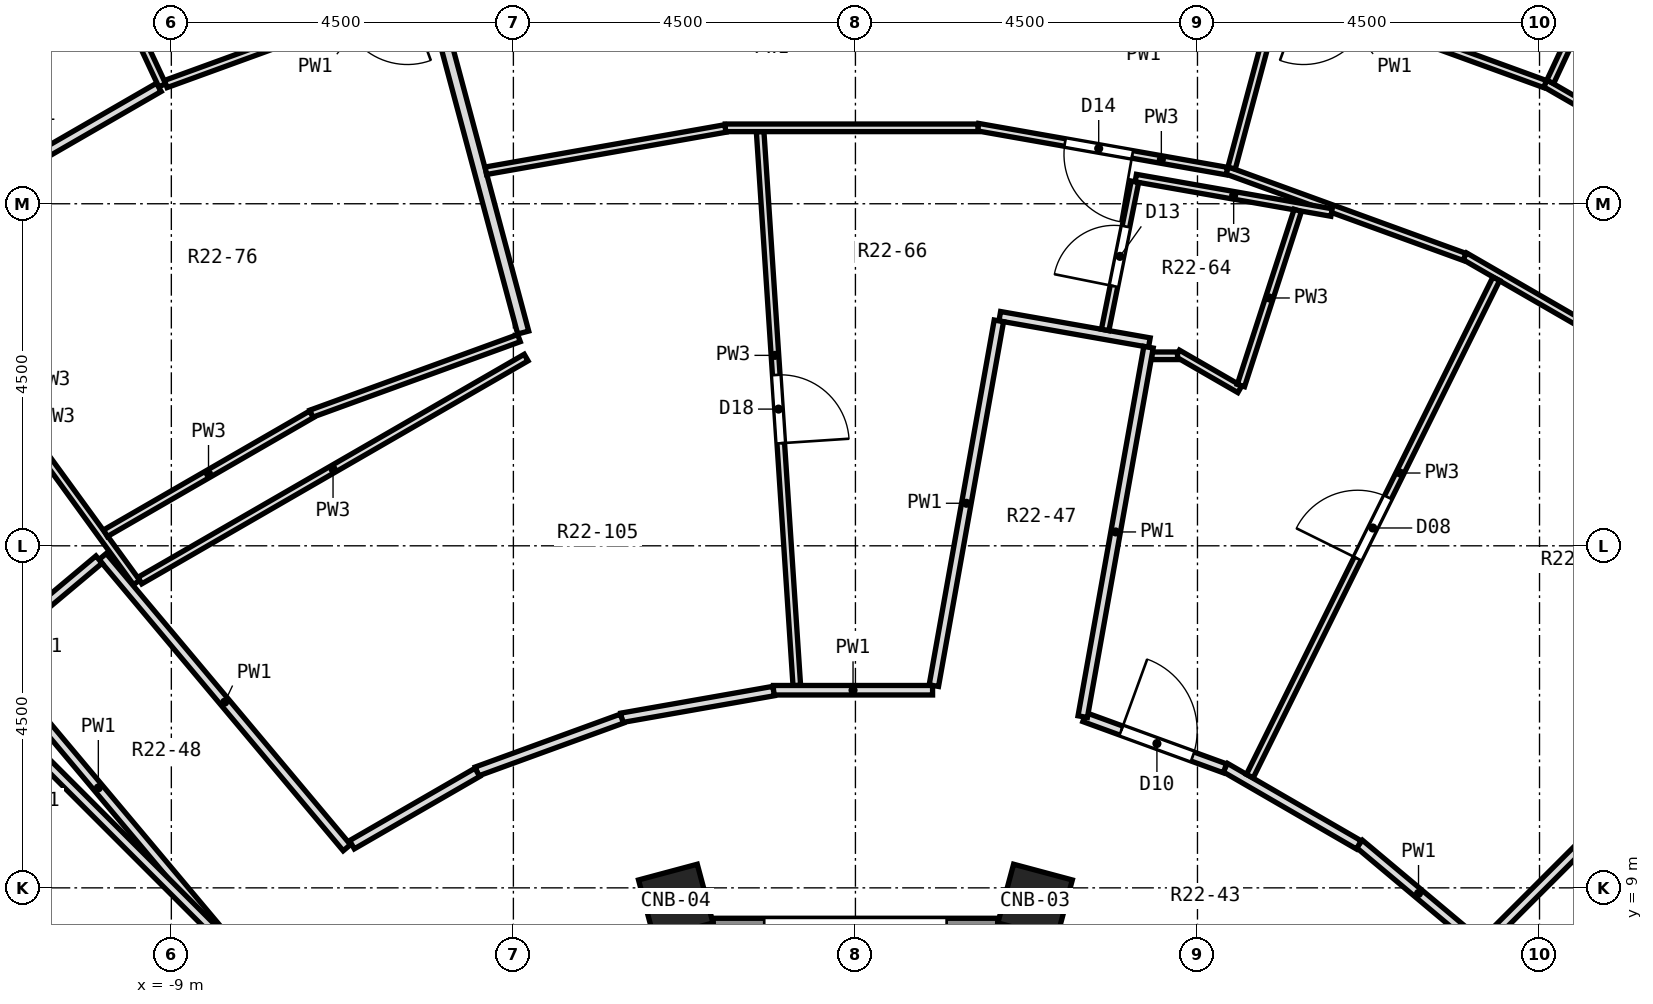
"""IFC4 building model, lengths in metres.
Left out: names, types, materials, properties, quantities, classifications, styles, units other than length and angle.
Written with IfcOpenShell. Run it as: python <this file> out.ifc"""

import sys

from ifc_helpers import new_model, si_unit, direction, frame, frame_2d, origin, origin_2d, place, context, subcontext, project, spatial, polyline, rectangle, outline, extrude, element, fill, save


model = new_model("IFC4")
c1 = context("Model", 3, precision=1e-05, world=origin(), true_north=direction((0.0, 1.0)))
c2 = subcontext(c1, "Body", "Model", "MODEL_VIEW")
j1 = project(units=[si_unit("LENGTHUNIT", "METRE"), si_unit("PLANEANGLEUNIT", "RADIAN")], contexts=[c1])
p1 = place(None, origin())
s1 = spatial("IfcSite", under=j1, at=p1, CompositionType="ELEMENT")
p2 = place(p1, origin())
s2 = spatial("IfcBuilding", under=s1, at=p2, CompositionType="ELEMENT")
p3 = place(p2, frame((0.0, 0.0, 141.4)))
s3 = spatial("IfcBuildingStorey", under=s2, at=p3, CompositionType="ELEMENT", Elevation=141.4)
for number, where, z_axis, x_axis in (
    (1, (2.364, 8.821, 0.0), (0.0, 0.0, 1.0), (0.259, 0.966, 0.0)),
    (2, (-2.364, 8.821, 0.0), (0.0, 0.0, 1.0), (-0.259, 0.966, 0.0)),
):
    element("IfcColumn", number, at=place(p3, frame(where, z_axis=z_axis, x_axis=x_axis)), inside=s3, PredefinedType="COLUMN", context=c2, shape_type="SweptSolid", body=[
        extrude(rectangle(XDim=0.8, YDim=0.8, at=origin_2d()), origin(), (0.0, 0.0, 1.0), 3.3),
    ])
p4 = place(p3, frame((1.874, 8.3, 0.0), z_axis=(0.0, 0.0, 1.0), x_axis=(-1.0, 0.0, 0.0)))
e3 = element("IfcWall", 3, at=p4, inside=s3, PredefinedType="SOLIDWALL", context=c2, shape_type="SweptSolid", body=[
    extrude(rectangle(XDim=3.748, YDim=0.6, at=frame_2d((1.874, 0.0))), origin(), (0.0, 0.0, 1.0), 2.8),
])
p5 = place(p4, frame((0.674, 0.0, 0.9)))
e4 = element("IfcOpeningElement", 4, at=p5, cuts=e3, PredefinedType="OPENING", context=c2, shape_type="SweptSolid", body=[
    extrude(rectangle(XDim=2.4, YDim=1.8, at=frame_2d((1.2, 0.9))), frame((0.0, 0.312, 0.0), z_axis=(0.0, -1.0, 0.0), x_axis=(1.0, 0.0, 0.0)), (0.0, 0.0, 1.0), 0.624),
])
p6 = place(p3, origin())
e5 = element("IfcWall", 5, at=p6, inside=s3, PredefinedType="SOLIDWALL", context=c2, shape_type="SweptSolid", body=[
    extrude(outline(polyline([(1.874, 8.538), (1.874, 8.0), (2.377, 7.865), (2.646, 8.331), (1.874, 8.538)])), origin(), (0.0, 0.0, 1.0), 2.8),
])
p7 = place(p3, origin())
e6 = element("IfcWall", 6, at=p7, inside=s3, PredefinedType="SOLIDWALL", context=c2, shape_type="SweptSolid", body=[
    extrude(outline(polyline([(-2.646, 8.331), (-2.377, 7.865), (-1.874, 8.0), (-1.874, 8.538), (-2.646, 8.331)])), origin(), (0.0, 0.0, 1.0), 2.8),
])
p8 = place(p3, frame((-1.254, 18.949, 0.0), z_axis=(0.0, 0.0, 1.0), x_axis=(0.066059696755, -0.997815672589, 0.0)))
e7 = element("IfcWall", 7, at=p8, inside=s3, PredefinedType="PARTITIONING", context=c2, shape_type="SweptSolid", body=[
    extrude(rectangle(XDim=7.303, YDim=0.1, at=frame_2d((3.651, 0.0))), origin(), (0.0, 0.0, 1.0), 2.8),
])
p9 = place(p8, frame((3.208, 0.0, 0.0)))
e8 = element("IfcOpeningElement", 8, at=p9, cuts=e7, PredefinedType="OPENING", context=c2, shape_type="SweptSolid", body=[
    extrude(rectangle(XDim=0.9, YDim=2.1, at=frame_2d((0.45, 1.05))), frame((0.0, 0.062, 0.0), z_axis=(0.0, -1.0, 0.0), x_axis=(1.0, 0.0, 0.0)), (0.0, 0.0, 1.0), 0.124),
])
p10 = place(p3, frame((-6.643, 24.791, 0.0), z_axis=(0.0, 0.0, 1.0), x_axis=(0.258629569049, -0.965976576328, 0.0)))
e9 = element("IfcWall", 9, at=p10, inside=s3, PredefinedType="PARTITIONING", context=c2, shape_type="SweptSolid", body=[
    extrude(rectangle(XDim=8.784, YDim=0.15, at=frame_2d((4.392, 0.0))), origin(), (0.0, 0.0, 1.0), 2.8),
])
p11 = place(p3, frame((-10.847, 23.26, 0.0), z_axis=(0.0, 0.0, 1.0), x_axis=(0.422784035137, -0.906230467173, 0.0)))
e10 = element("IfcWall", 10, at=p11, inside=s3, PredefinedType="PARTITIONING", context=c2, shape_type="SweptSolid", body=[
    extrude(rectangle(XDim=4.085, YDim=0.1, at=frame_2d((2.042, 0.0))), origin(), (0.0, 0.0, 1.0), 2.8),
])
p12 = place(p3, frame((-12.629, 17.382, 0.0), z_axis=(0.0, 0.0, 1.0), x_axis=(0.587934886014, -0.808908257967, 0.0)))
e11 = element("IfcWall", 11, at=p12, inside=s3, PredefinedType="PARTITIONING", context=c2, shape_type="SweptSolid", body=[
    extrude(rectangle(XDim=5.395, YDim=0.1, at=frame_2d((2.698, 0.0))), origin(), (0.0, 0.0, 1.0), 2.8),
])
p13 = place(p12, frame((0.84, 0.0, 0.0)))
e12 = element("IfcOpeningElement", 12, at=p13, cuts=e11, PredefinedType="OPENING", context=c2, shape_type="SweptSolid", body=[
    extrude(rectangle(XDim=1.0, YDim=2.1, at=frame_2d((0.5, 1.05))), frame((0.0, 0.062, 0.0), z_axis=(0.0, -1.0, 0.0), x_axis=(1.0, 0.0, 0.0)), (0.0, 0.0, 1.0), 0.124),
])
p14 = place(p3, frame((-11.511, 12.164, 0.0), z_axis=(0.0, 0.0, 1.0), x_axis=(0.64269368401, -0.766123246308, 0.0)))
e13 = element("IfcWall", 13, at=p14, inside=s3, PredefinedType="PARTITIONING", context=c2, shape_type="SweptSolid", body=[
    extrude(rectangle(XDim=4.826, YDim=0.125, at=frame_2d((2.413, 0.0))), origin(), (0.0, 0.0, 1.0), 2.8),
])
p15 = place(p3, frame((-9.904, 13.359, 0.0), z_axis=(0.0, 0.0, 1.0), x_axis=(0.64260671374, -0.766196196451, 0.0)))
e14 = element("IfcWall", 14, at=p15, inside=s3, PredefinedType="PARTITIONING", context=c2, shape_type="SweptSolid", body=[
    extrude(rectangle(XDim=5.0, YDim=0.125, at=frame_2d((2.5, 0.0))), origin(), (0.0, 0.0, 1.0), 2.8),
])
p16 = place(p3, frame((-13.097, 13.097, 0.0), z_axis=(0.0, 0.0, 1.0), x_axis=(0.707106781187, -0.707106781187, 0.0)))
e15 = element("IfcWall", 15, at=p16, inside=s3, PredefinedType="PARTITIONING", context=c2, shape_type="SweptSolid", body=[
    extrude(rectangle(XDim=6.815, YDim=0.125, at=frame_2d((3.407, 0.0))), origin(), (0.0, 0.0, 1.0), 2.8),
])
p17 = place(p3, frame((6.63, 9.579, 0.0), z_axis=(0.0, 0.0, 1.0), x_axis=(0.766246910896, -0.642546240781, 0.0)))
e16 = element("IfcWall", 16, at=p17, inside=s3, PredefinedType="PARTITIONING", context=c2, shape_type="SweptSolid", body=[
    extrude(rectangle(XDim=2.031, YDim=0.125, at=frame_2d((1.015, 0.0))), origin(), (0.0, 0.0, 1.0), 2.8),
])
p18 = place(p3, frame((4.865, 10.583, 0.0), z_axis=(0.0, 0.0, 1.0), x_axis=(0.865305530051, -0.50124479016, 0.0)))
e17 = element("IfcWall", 17, at=p18, inside=s3, PredefinedType="PARTITIONING", context=c2, shape_type="SweptSolid", body=[
    extrude(rectangle(XDim=2.031, YDim=0.125, at=frame_2d((1.015, 0.0))), origin(), (0.0, 0.0, 1.0), 2.8),
])
p19 = place(p3, frame((4.238, 16.031, 0.0), z_axis=(0.0, 0.0, 1.0), x_axis=(0.866215708717, -0.499670237228, 0.0)))
e18 = element("IfcWall", 18, at=p19, inside=s3, PredefinedType="PARTITIONING", context=c2, shape_type="SweptSolid", body=[
    extrude(rectangle(XDim=0.945, YDim=0.1, at=frame_2d((0.472, 0.0))), origin(), (0.0, 0.0, 1.0), 2.8),
])
p20 = place(p3, frame((8.016, 17.309, 0.0), z_axis=(0.0, 0.0, 1.0), x_axis=(0.865920199123, -0.500182175564, 0.0)))
e19 = element("IfcWall", 19, at=p20, inside=s3, PredefinedType="PARTITIONING", context=c2, shape_type="SweptSolid", body=[
    extrude(rectangle(XDim=3.325, YDim=0.1, at=frame_2d((1.663, 0.0))), origin(), (0.0, 0.0, 1.0), 2.8),
])
p21 = place(p3, frame((9.076, 19.583, 0.0), z_axis=(0.0, 0.0, 1.0), x_axis=(0.865841628869, -0.500318172484, 0.0)))
e20 = element("IfcWall", 20, at=p21, inside=s3, PredefinedType="PARTITIONING", context=c2, shape_type="SweptSolid", body=[
    extrude(rectangle(XDim=2.306, YDim=0.1, at=frame_2d((1.153, 0.0))), origin(), (0.0, 0.0, 1.0), 2.8),
])
p22 = place(p3, frame((3.013, 11.246, 0.0), z_axis=(0.0, 0.0, 1.0), x_axis=(0.939532310436, -0.342460271633, 0.0)))
e21 = element("IfcWall", 21, at=p22, inside=s3, PredefinedType="PARTITIONING", context=c2, shape_type="SweptSolid", body=[
    extrude(rectangle(XDim=1.968, YDim=0.125, at=frame_2d((0.984, 0.0))), origin(), (0.0, 0.0, 1.0), 2.8),
])
p23 = place(p22, frame((0.515, 0.0, 0.0)))
e22 = element("IfcOpeningElement", 22, at=p23, cuts=e21, PredefinedType="OPENING", context=c2, shape_type="SweptSolid", body=[
    extrude(rectangle(XDim=1.0, YDim=2.1, at=frame_2d((0.5, 1.05))), frame((0.0, 0.074, 0.0), z_axis=(0.0, -1.0, 0.0), x_axis=(1.0, 0.0, 0.0)), (0.0, 0.0, 1.0), 0.149),
])
p24 = place(p3, frame((4.888, 18.438, 0.0), z_axis=(0.0, 0.0, 1.0), x_axis=(0.939679760884, -0.342055473549, 0.0)))
e23 = element("IfcWall", 23, at=p24, inside=s3, PredefinedType="PARTITIONING", context=c2, shape_type="SweptSolid", body=[
    extrude(rectangle(XDim=3.325, YDim=0.1, at=frame_2d((1.663, 0.0))), origin(), (0.0, 0.0, 1.0), 2.8),
])
p25 = place(p3, frame((7.001, 20.329, 0.0), z_axis=(0.0, 0.0, 1.0), x_axis=(0.939728749343, -0.341920864613, 0.0)))
e24 = element("IfcWall", 24, at=p25, inside=s3, PredefinedType="PARTITIONING", context=c2, shape_type="SweptSolid", body=[
    extrude(rectangle(XDim=2.205, YDim=0.1, at=frame_2d((1.103, 0.0))), origin(), (0.0, 0.0, 1.0), 2.8),
])
p26 = place(p3, frame((1.899, 16.521, 0.0), z_axis=(0.0, 0.0, 1.0), x_axis=(0.984836400178, -0.173485633079, 0.0)))
e25 = element("IfcWall", 25, at=p26, inside=s3, PredefinedType="PARTITIONING", context=c2, shape_type="SweptSolid", body=[
    extrude(rectangle(XDim=1.998, YDim=0.125, at=frame_2d((0.999, 0.0))), origin(), (0.0, 0.0, 1.0), 2.8),
])
p27 = place(p3, frame((3.688, 18.338, 0.0), z_axis=(0.0, 0.0, 1.0), x_axis=(0.984859586639, -0.173353957572, 0.0)))
e26 = element("IfcWall", 26, at=p27, inside=s3, PredefinedType="PARTITIONING", context=c2, shape_type="SweptSolid", body=[
    extrude(rectangle(XDim=2.615, YDim=0.1, at=frame_2d((1.308, 0.0))), origin(), (0.0, 0.0, 1.0), 2.8),
])
p28 = place(p3, frame((1.612, 19.008, 0.0), z_axis=(0.0, 0.0, 1.0), x_axis=(0.984770991222, -0.173856535243, 0.0)))
e27 = element("IfcWall", 27, at=p28, inside=s3, PredefinedType="PARTITIONING", context=c2, shape_type="SweptSolid", body=[
    extrude(rectangle(XDim=3.325, YDim=0.1, at=frame_2d((1.663, 0.0))), origin(), (0.0, 0.0, 1.0), 2.8),
])
p29 = place(p28, frame((1.163, 0.0, 0.0)))
e28 = element("IfcOpeningElement", 28, at=p29, cuts=e27, PredefinedType="OPENING", context=c2, shape_type="SweptSolid", body=[
    extrude(rectangle(XDim=0.9, YDim=2.1, at=frame_2d((0.45, 1.05))), frame((0.0, 0.062, 0.0), z_axis=(0.0, -1.0, 0.0), x_axis=(1.0, 0.0, 0.0)), (0.0, 0.0, 1.0), 0.124),
])
p30 = place(p3, frame((-1.078, 11.6, 0.0), z_axis=(0.0, 0.0, 1.0), x_axis=(1.0, 0.0, 0.0)))
e29 = element("IfcWall", 29, at=p30, inside=s3, PredefinedType="PARTITIONING", context=c2, shape_type="SweptSolid", body=[
    extrude(rectangle(XDim=2.093, YDim=0.125, at=frame_2d((1.047, 0.0))), origin(), (0.0, 0.0, 1.0), 2.8),
])
p31 = place(p3, frame((3.899, 16.0, 0.0), z_axis=(0.0, 0.0, 1.0), x_axis=(1.0, 0.0, 0.0)))
e30 = element("IfcWall", 30, at=p31, inside=s3, PredefinedType="PARTITIONING", context=c2, shape_type="SweptSolid", body=[
    extrude(rectangle(XDim=0.339, YDim=0.1, at=frame_2d((0.169, 0.0))), origin(), (0.0, 0.0, 1.0), 2.8),
])
p32 = place(p3, frame((-1.713, 18.999, 0.0), z_axis=(0.0, 0.0, 1.0), x_axis=(1.0, 0.0, 0.0)))
e31 = element("IfcWall", 31, at=p32, inside=s3, PredefinedType="PARTITIONING", context=c2, shape_type="SweptSolid", body=[
    extrude(rectangle(XDim=3.325, YDim=0.1, at=frame_2d((1.663, 0.0))), origin(), (0.0, 0.0, 1.0), 2.8),
])
p33 = place(p3, frame((-3.076, 11.237, 0.0), z_axis=(0.0, 0.0, 1.0), x_axis=(0.984851276096, 0.173401164851, 0.0)))
e32 = element("IfcWall", 32, at=p33, inside=s3, PredefinedType="PARTITIONING", context=c2, shape_type="SweptSolid", body=[
    extrude(rectangle(XDim=2.03, YDim=0.125, at=frame_2d((1.015, 0.0))), origin(), (0.0, 0.0, 1.0), 2.8),
])
p34 = place(p3, frame((-4.862, 18.434, 0.0), z_axis=(0.0, 0.0, 1.0), x_axis=(0.984777412926, 0.173820157031, 0.0)))
e33 = element("IfcWall", 33, at=p34, inside=s3, PredefinedType="PARTITIONING", context=c2, shape_type="SweptSolid", body=[
    extrude(rectangle(XDim=3.199, YDim=0.1, at=frame_2d((1.6, 0.0))), origin(), (0.0, 0.0, 1.0), 2.8),
])
p35 = place(p3, frame((-4.981, 10.531, 0.0), z_axis=(0.0, 0.0, 1.0), x_axis=(0.939529919943, 0.342466829826, 0.0)))
e34 = element("IfcWall", 34, at=p35, inside=s3, PredefinedType="PARTITIONING", context=c2, shape_type="SweptSolid", body=[
    extrude(rectangle(XDim=2.031, YDim=0.125, at=frame_2d((1.016, 0.0))), origin(), (0.0, 0.0, 1.0), 2.8),
])
p36 = place(p3, frame((-7.161, 15.238, 0.0), z_axis=(0.0, 0.0, 1.0), x_axis=(0.939722354216, 0.341938440346, 0.0)))
e35 = element("IfcWall", 35, at=p36, inside=s3, PredefinedType="PARTITIONING", context=c2, shape_type="SweptSolid", body=[
    extrude(rectangle(XDim=2.909, YDim=0.1, at=frame_2d((1.455, 0.0))), origin(), (0.0, 0.0, 1.0), 2.8),
])
p37 = place(p3, frame((-9.073, 19.575, 0.0), z_axis=(0.0, 0.0, 1.0), x_axis=(0.939725675468, 0.341929312674, 0.0)))
e36 = element("IfcWall", 36, at=p37, inside=s3, PredefinedType="PARTITIONING", context=c2, shape_type="SweptSolid", body=[
    extrude(rectangle(XDim=2.105, YDim=0.1, at=frame_2d((1.052, 0.0))), origin(), (0.0, 0.0, 1.0), 2.8),
])
p38 = place(p3, frame((-6.624, 9.567, 0.0), z_axis=(0.0, 0.0, 1.0), x_axis=(0.865978549379, 0.500081145431, 0.0)))
e37 = element("IfcWall", 37, at=p38, inside=s3, PredefinedType="PARTITIONING", context=c2, shape_type="SweptSolid", body=[
    extrude(rectangle(XDim=1.905, YDim=0.125, at=frame_2d((0.953, 0.0))), origin(), (0.0, 0.0, 1.0), 2.8),
])
p39 = place(p3, frame((-9.414, 13.043, 0.0), z_axis=(0.0, 0.0, 1.0), x_axis=(0.866050468633, 0.499956583896, 0.0)))
e38 = element("IfcWall", 38, at=p39, inside=s3, PredefinedType="PARTITIONING", context=c2, shape_type="SweptSolid", body=[
    extrude(rectangle(XDim=5.867, YDim=0.1, at=frame_2d((2.934, 0.0))), origin(), (0.0, 0.0, 1.0), 2.8),
])
p40 = place(p3, frame((-9.866, 13.666, 0.0), z_axis=(0.0, 0.0, 1.0), x_axis=(0.866045268016, 0.499965592563, 0.0)))
e39 = element("IfcWall", 39, at=p40, inside=s3, PredefinedType="PARTITIONING", context=c2, shape_type="SweptSolid", body=[
    extrude(rectangle(XDim=3.129, YDim=0.1, at=frame_2d((1.564, 0.0))), origin(), (0.0, 0.0, 1.0), 2.8),
])
p41 = place(p3, frame((-12.432, 17.645, 0.0), z_axis=(0.0, 0.0, 1.0), x_axis=(0.866012062527, 0.500023107024, 0.0)))
e40 = element("IfcWall", 40, at=p41, inside=s3, PredefinedType="PARTITIONING", context=c2, shape_type="SweptSolid", body=[
    extrude(rectangle(XDim=3.772, YDim=0.125, at=frame_2d((1.886, 0.0))), origin(), (0.0, 0.0, 1.0), 2.8),
])
p42 = place(p41, frame((0.783, 0.0, 0.0)))
e41 = element("IfcOpeningElement", 41, at=p42, cuts=e40, PredefinedType="OPENING", context=c2, shape_type="SweptSolid", body=[
    extrude(rectangle(XDim=0.9, YDim=2.1, at=frame_2d((0.45, 1.05))), frame((0.0, 0.074, 0.0), z_axis=(0.0, -1.0, 0.0), x_axis=(1.0, 0.0, 0.0)), (0.0, 0.0, 1.0), 0.149),
])
p43 = place(p3, frame((-11.388, 12.114, 0.0), z_axis=(0.0, 0.0, 1.0), x_axis=(0.766199817297, 0.642602396489, 0.0)))
e42 = element("IfcWall", 42, at=p43, inside=s3, PredefinedType="PARTITIONING", context=c2, shape_type="SweptSolid", body=[
    extrude(rectangle(XDim=1.875, YDim=0.125, at=frame_2d((0.937, 0.0))), origin(), (0.0, 0.0, 1.0), 2.8),
])
p44 = place(p3, frame((8.278, 8.278, 0.0), z_axis=(0.0, 0.0, 1.0), x_axis=(0.707106781187, 0.707106781187, 0.0)))
e43 = element("IfcWall", 43, at=p44, inside=s3, PredefinedType="PARTITIONING", context=c2, shape_type="SweptSolid", body=[
    extrude(rectangle(XDim=6.75, YDim=0.125, at=frame_2d((3.375, 0.0))), origin(), (0.0, 0.0, 1.0), 2.8),
])
p45 = place(p3, frame((5.189, 10.47, 0.0), z_axis=(0.0, 0.0, 1.0), x_axis=(0.444040739055, 0.896006597107, 0.0)))
e44 = element("IfcWall", 44, at=p45, inside=s3, PredefinedType="PARTITIONING", context=c2, shape_type="SweptSolid", body=[
    extrude(rectangle(XDim=7.301, YDim=0.1, at=frame_2d((3.65, 0.0))), origin(), (0.0, 0.0, 1.0), 2.8),
])
p46 = place(p45, frame((3.193, 0.0, 0.0)))
e45 = element("IfcOpeningElement", 45, at=p46, cuts=e44, PredefinedType="OPENING", context=c2, shape_type="SweptSolid", body=[
    extrude(rectangle(XDim=0.9, YDim=2.1, at=frame_2d((0.45, 1.05))), frame((0.0, 0.062, 0.0), z_axis=(0.0, -1.0, 0.0), x_axis=(1.0, 0.0, 0.0)), (0.0, 0.0, 1.0), 0.124),
])
p47 = place(p3, frame((9.141, 19.603, 0.0), z_axis=(0.0, 0.0, 1.0), x_axis=(0.42279934512, 0.906223324444, 0.0)))
e46 = element("IfcWall", 46, at=p47, inside=s3, PredefinedType="PARTITIONING", context=c2, shape_type="SweptSolid", body=[
    extrude(rectangle(XDim=4.035, YDim=0.1, at=frame_2d((2.018, 0.0))), origin(), (0.0, 0.0, 1.0), 2.8),
])
p48 = place(p3, frame((5.072, 15.609, 0.0), z_axis=(0.0, 0.0, 1.0), x_axis=(0.30874872516, 0.95114364042, 0.0)))
e47 = element("IfcWall", 47, at=p48, inside=s3, PredefinedType="PARTITIONING", context=c2, shape_type="SweptSolid", body=[
    extrude(rectangle(XDim=2.422, YDim=0.1, at=frame_2d((1.211, 0.0))), origin(), (0.0, 0.0, 1.0), 2.8),
])
p49 = place(p3, frame((4.949, 18.469, 0.0), z_axis=(0.0, 0.0, 1.0), x_axis=(0.258793270627, 0.96593273217, 0.0)))
e48 = element("IfcWall", 48, at=p49, inside=s3, PredefinedType="PARTITIONING", context=c2, shape_type="SweptSolid", body=[
    extrude(rectangle(XDim=6.544, YDim=0.1, at=frame_2d((3.272, 0.0))), origin(), (0.0, 0.0, 1.0), 2.8),
])
p50 = place(p3, frame((3.285, 16.34, 0.0), z_axis=(0.0, 0.0, 1.0), x_axis=(0.197131685641, 0.980377018558, 0.0)))
e49 = element("IfcWall", 49, at=p50, inside=s3, PredefinedType="PARTITIONING", context=c2, shape_type="SweptSolid", body=[
    extrude(rectangle(XDim=1.988, YDim=0.1, at=frame_2d((0.994, 0.0))), origin(), (0.0, 0.0, 1.0), 2.8),
])
p51 = place(p50, frame((0.587, 0.0, 0.0)))
e50 = element("IfcOpeningElement", 50, at=p51, cuts=e49, PredefinedType="OPENING", context=c2, shape_type="SweptSolid", body=[
    extrude(rectangle(XDim=0.8, YDim=2.1, at=frame_2d((0.4, 1.05))), frame((0.0, 0.062, 0.0), z_axis=(0.0, -1.0, 0.0), x_axis=(1.0, 0.0, 0.0)), (0.0, 0.0, 1.0), 0.124),
])
p52 = place(p3, frame((2.99, 11.253, 0.0), z_axis=(0.0, 0.0, 1.0), x_axis=(0.175376377953, 0.984501460667, 0.0)))
e51 = element("IfcWall", 51, at=p52, inside=s3, PredefinedType="PARTITIONING", context=c2, shape_type="SweptSolid", body=[
    extrude(rectangle(XDim=4.936, YDim=0.125, at=frame_2d((2.468, 0.0))), origin(), (0.0, 0.0, 1.0), 2.8),
])
p53 = place(p3, frame((1.032, 11.661, 0.0), z_axis=(0.0, 0.0, 1.0), x_axis=(0.175547946832, 0.984470882435, 0.0)))
e52 = element("IfcWall", 52, at=p53, inside=s3, PredefinedType="PARTITIONING", context=c2, shape_type="SweptSolid", body=[
    extrude(rectangle(XDim=4.875, YDim=0.125, at=frame_2d((2.437, 0.0))), origin(), (0.0, 0.0, 1.0), 2.8),
])
p54 = place(p46, origin())
e53 = element("IfcDoor", 53, at=p54, inside=s3, OperationType="SINGLE_SWING_LEFT", PredefinedType="DOOR", context=c2, shape_type="SweptSolid", body=[
    extrude(rectangle(XDim=0.9, YDim=2.1, at=frame_2d((0.45, 1.05))), frame((0.0, 0.025, 0.0), z_axis=(0.0, -1.0, 0.0), x_axis=(1.0, 0.0, 0.0)), (0.0, 0.0, 1.0), 0.05),
])
fill(e45, e53)
p55 = place(p23, origin())
e54 = element("IfcDoor", 54, at=p55, inside=s3, OperationType="SINGLE_SWING_LEFT", PredefinedType="DOOR", context=c2, shape_type="SweptSolid", body=[
    extrude(rectangle(XDim=1.0, YDim=2.1, at=frame_2d((0.5, 1.05))), frame((0.0, 0.025, 0.0), z_axis=(0.0, -1.0, 0.0), x_axis=(1.0, 0.0, 0.0)), (0.0, 0.0, 1.0), 0.05),
])
fill(e22, e54)
p56 = place(p51, origin())
e55 = element("IfcDoor", 55, at=p56, inside=s3, OperationType="SINGLE_SWING_LEFT", PredefinedType="DOOR", context=c2, shape_type="SweptSolid", body=[
    extrude(rectangle(XDim=0.8, YDim=2.1, at=frame_2d((0.4, 1.05))), frame((0.0, 0.025, 0.0), z_axis=(0.0, -1.0, 0.0), x_axis=(1.0, 0.0, 0.0)), (0.0, 0.0, 1.0), 0.05),
])
fill(e50, e55)
p57 = place(p29, frame((0.9, 0.0, 0.0), z_axis=(0.0, 0.0, 1.0), x_axis=(-1.0, 0.0, 0.0)))
e56 = element("IfcDoor", 56, at=p57, inside=s3, OperationType="SINGLE_SWING_LEFT", PredefinedType="DOOR", context=c2, shape_type="SweptSolid", body=[
    extrude(rectangle(XDim=0.9, YDim=2.1, at=frame_2d((0.45, 1.05))), frame((0.0, 0.025, 0.0), z_axis=(0.0, -1.0, 0.0), x_axis=(1.0, 0.0, 0.0)), (0.0, 0.0, 1.0), 0.05),
])
fill(e28, e56)
p58 = place(p9, origin())
e57 = element("IfcDoor", 57, at=p58, inside=s3, OperationType="SINGLE_SWING_RIGHT", PredefinedType="DOOR", context=c2, shape_type="SweptSolid", body=[
    extrude(rectangle(XDim=0.9, YDim=2.1, at=frame_2d((0.45, 1.05))), frame((0.0, 0.025, 0.0), z_axis=(0.0, -1.0, 0.0), x_axis=(1.0, 0.0, 0.0)), (0.0, 0.0, 1.0), 0.05),
])
fill(e8, e57)
save(model, sys.argv[1])
